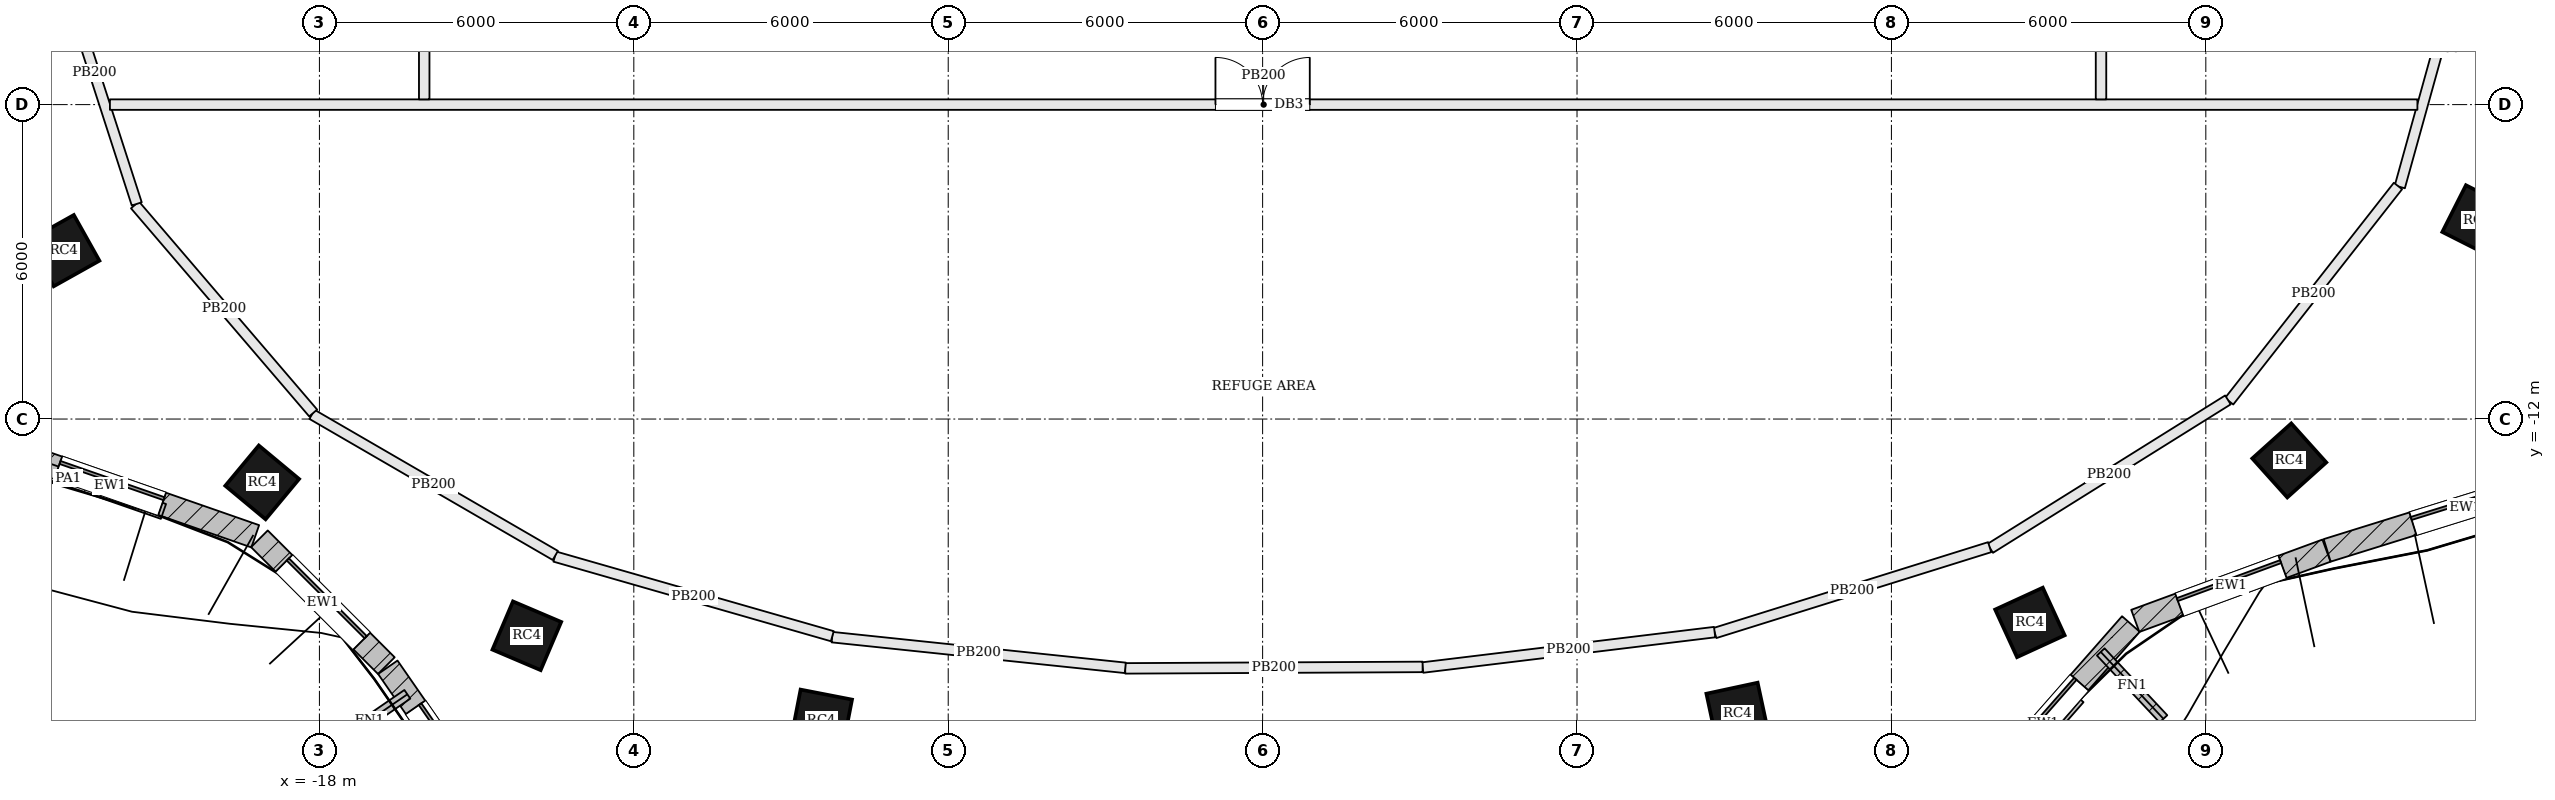
"""IFC4 building model, lengths in metres.
Left out: names, types, materials, properties, quantities, classifications, styles, units other than length and angle.
Written with IfcOpenShell. Run it as: python <this file> out.ifc"""

import sys

from ifc_helpers import new_model, si_unit, direction, frame, frame_2d, origin, origin_2d, place, context, subcontext, project, spatial, rectangle, extrude, element, fill, save


model = new_model("IFC4")
c1 = context("Model", 3, precision=1e-05, world=origin(), true_north=direction((0.0, 1.0)))
c2 = subcontext(c1, "Body", "Model", "MODEL_VIEW")
j1 = project(units=[si_unit("LENGTHUNIT", "METRE"), si_unit("PLANEANGLEUNIT", "RADIAN")], contexts=[c1])
p1 = place(None, origin())
s1 = spatial("IfcSite", under=j1, at=p1, CompositionType="ELEMENT")
p2 = place(p1, origin())
s2 = spatial("IfcBuilding", under=s1, at=p2, CompositionType="ELEMENT")
p3 = place(p2, frame((0.0, 0.0, 240.9)))
s3 = spatial("IfcBuildingStorey", under=s2, at=p3, CompositionType="ELEMENT", Elevation=240.9)
for number, where, z_axis, x_axis in (
    (1, (-22.879, -8.787, 0.0), (0.0, 0.0, 1.0), (0.489, -0.873, 0.0)),
    (2, (-19.092, -13.209, 0.0), (0.0, 0.0, 1.0), (0.769, -0.639, 0.0)),
    (3, (-14.042, -16.136, 0.0), (0.0, 0.0, 1.0), (0.92, -0.392, 0.0)),
    (4, (-8.422, -17.749, 0.0), (0.0, 0.0, 1.0), (0.982, -0.191, 0.0)),
    (5, (9.063, -17.625, 0.0), (0.0, 0.0, 1.0), (0.978, 0.21, 0.0)),
    (6, (14.643, -15.881, 0.0), (0.0, 0.0, 1.0), (0.909, 0.417, 0.0)),
    (7, (19.593, -12.79, 0.0), (0.0, 0.0, 1.0), (0.744, 0.668, 0.0)),
    (8, (23.185, -8.21, 0.0), (0.0, 0.0, 1.0), (0.451, 0.893, 0.0)),
):
    element("IfcColumn", number, at=place(p3, frame(where, z_axis=z_axis, x_axis=x_axis)), inside=s3, PredefinedType="COLUMN", context=c2, shape_type="SweptSolid", body=[
        extrude(rectangle(XDim=1.0, YDim=1.0, at=origin_2d()), origin(), (0.0, 0.0, 1.0), 3.9),
    ])
p4 = place(p3, frame((-24.761, -12.31, 0.0), z_axis=(0.0, 0.0, 1.0), x_axis=(0.944397305248, -0.328806523414, 0.0)))
e9 = element("IfcWall", 9, at=p4, inside=s3, PredefinedType="SOLIDWALL", context=c2, shape_type="SweptSolid", body=[
    extrude(rectangle(XDim=5.862, YDim=0.45, at=frame_2d((2.931, 0.0))), origin(), (0.0, 0.0, 1.0), 3.7),
])
p5 = place(p4, frame((1.881, 0.0, 0.9)))
e10 = element("IfcOpeningElement", 10, at=p5, cuts=e9, PredefinedType="OPENING", context=c2, shape_type="SweptSolid", body=[
    extrude(rectangle(XDim=2.1, YDim=2.3, at=frame_2d((1.05, 1.15))), frame((0.0, 0.235, 0.0), z_axis=(0.0, -1.0, 0.0), x_axis=(1.0, 0.0, 0.0)), (0.0, 0.0, 1.0), 0.47),
])
p6 = place(p3, frame((-19.145, -14.285, 0.0), z_axis=(0.0, 0.0, 1.0), x_axis=(0.707427521052, -0.706785895769, 0.0)))
e11 = element("IfcWall", 11, at=p6, inside=s3, PredefinedType="SOLIDWALL", context=c2, shape_type="SweptSolid", body=[
    extrude(rectangle(XDim=3.425, YDim=0.45, at=frame_2d((1.712, 0.0))), origin(), (0.0, 0.0, 1.0), 3.7),
])
p7 = place(p6, frame((0.662, 0.0, 0.9)))
e12 = element("IfcOpeningElement", 12, at=p7, cuts=e11, PredefinedType="OPENING", context=c2, shape_type="SweptSolid", body=[
    extrude(rectangle(XDim=2.1, YDim=2.3, at=frame_2d((1.05, 1.15))), frame((0.0, 0.235, 0.0), z_axis=(0.0, -1.0, 0.0), x_axis=(1.0, 0.0, 0.0)), (0.0, 0.0, 1.0), 0.47),
])
p8 = place(p3, frame((-16.695, -16.737, 0.0), z_axis=(0.0, 0.0, 1.0), x_axis=(0.569652445465, -0.821885692402, 0.0)))
e13 = element("IfcWall", 13, at=p8, inside=s3, PredefinedType="SOLIDWALL", context=c2, shape_type="SweptSolid", body=[
    extrude(rectangle(XDim=3.959, YDim=0.45, at=frame_2d((1.979, 0.0))), origin(), (0.0, 0.0, 1.0), 3.7),
])
p9 = place(p8, frame((0.929, 0.0, 0.9)))
e14 = element("IfcOpeningElement", 14, at=p9, cuts=e13, PredefinedType="OPENING", context=c2, shape_type="SweptSolid", body=[
    extrude(rectangle(XDim=2.1, YDim=2.3, at=frame_2d((1.05, 1.15))), frame((0.0, 0.235, 0.0), z_axis=(0.0, -1.0, 0.0), x_axis=(1.0, 0.0, 0.0)), (0.0, 0.0, 1.0), 0.47),
])
p10 = place(p3, frame((13.221, -19.719, 0.0), z_axis=(0.0, 0.0, 1.0), x_axis=(0.660424908916, 0.750892095899, 0.0)))
e15 = element("IfcWall", 15, at=p10, inside=s3, PredefinedType="SOLIDWALL", context=c2, shape_type="SweptSolid", body=[
    extrude(rectangle(XDim=5.071, YDim=0.45, at=frame_2d((2.535, 0.0))), origin(), (0.0, 0.0, 1.0), 3.7),
])
p11 = place(p10, frame((1.485, 0.0, 0.9)))
e16 = element("IfcOpeningElement", 16, at=p11, cuts=e15, PredefinedType="OPENING", context=c2, shape_type="SweptSolid", body=[
    extrude(rectangle(XDim=2.1, YDim=2.3, at=frame_2d((1.05, 1.15))), frame((0.0, 0.235, 0.0), z_axis=(0.0, -1.0, 0.0), x_axis=(1.0, 0.0, 0.0)), (0.0, 0.0, 1.0), 0.47),
])
p12 = place(p3, frame((16.654, -15.852, 0.0), z_axis=(0.0, 0.0, 1.0), x_axis=(0.938636568132, 0.344907803572, 0.0)))
e17 = element("IfcWall", 17, at=p12, inside=s3, PredefinedType="SOLIDWALL", context=c2, shape_type="SweptSolid", body=[
    extrude(rectangle(XDim=3.887, YDim=0.45, at=frame_2d((1.944, 0.0))), origin(), (0.0, 0.0, 1.0), 3.7),
])
p13 = place(p12, frame((0.894, 0.0, 0.9)))
e18 = element("IfcOpeningElement", 18, at=p13, cuts=e17, PredefinedType="OPENING", context=c2, shape_type="SweptSolid", body=[
    extrude(rectangle(XDim=2.1, YDim=2.3, at=frame_2d((1.05, 1.15))), frame((0.0, 0.235, 0.0), z_axis=(0.0, -1.0, 0.0), x_axis=(1.0, 0.0, 0.0)), (0.0, 0.0, 1.0), 0.47),
])
p14 = place(p3, frame((20.316, -14.507, 0.0), z_axis=(0.0, 0.0, 1.0), x_axis=(0.954807195185, 0.297225873743, 0.0)))
e19 = element("IfcWall", 19, at=p14, inside=s3, PredefinedType="SOLIDWALL", context=c2, shape_type="SweptSolid", body=[
    extrude(rectangle(XDim=5.526, YDim=0.45, at=frame_2d((2.763, 0.0))), origin(), (0.0, 0.0, 1.0), 3.7),
])
p15 = place(p14, frame((1.713, 0.0, 0.9)))
e20 = element("IfcOpeningElement", 20, at=p15, cuts=e19, PredefinedType="OPENING", context=c2, shape_type="SweptSolid", body=[
    extrude(rectangle(XDim=2.1, YDim=2.3, at=frame_2d((1.05, 1.15))), frame((0.0, 0.235, 0.0), z_axis=(0.0, -1.0, 0.0), x_axis=(1.0, 0.0, 0.0)), (0.0, 0.0, 1.0), 0.47),
])
p16 = place(p3, frame((-16.322, -17.253, 0.0), z_axis=(0.0, 0.0, 1.0), x_axis=(-0.824440606412, -0.565948483962, 0.0)))
e21 = element("IfcWall", 21, at=p16, inside=s3, PredefinedType="SOLIDWALL", context=c2, shape_type="SweptSolid", body=[
    extrude(rectangle(XDim=1.75, YDim=0.2, at=frame_2d((0.875, 0.0))), origin(), (0.0, 0.0, 1.0), 3.7),
])
p17 = place(p3, frame((15.995, -16.444, 0.0), z_axis=(0.0, 0.0, 1.0), x_axis=(0.683852936488, -0.729619874494, 0.0)))
e22 = element("IfcWall", 22, at=p17, inside=s3, PredefinedType="SOLIDWALL", context=c2, shape_type="SweptSolid", body=[
    extrude(rectangle(XDim=1.75, YDim=0.2, at=frame_2d((0.875, 0.0))), origin(), (0.0, 0.0, 1.0), 3.7),
])
p18 = place(p3, frame((-24.605, -12.5, 3.9), z_axis=(0.0, 0.0, 1.0), x_axis=(0.944373295981, -0.328875474668, 0.0)))
e23 = element("IfcWall", 23, at=p18, inside=s3, PredefinedType="PARAPET", context=c2, shape_type="SweptSolid", body=[
    extrude(rectangle(XDim=3.842, YDim=0.3, at=frame_2d((1.921, 0.0))), origin(), (0.0, 0.0, 1.0), 1.1),
])
p19 = place(p3, frame((13.339, -19.822, 3.9), z_axis=(0.0, 0.0, 1.0), x_axis=(0.660445690116, 0.7508738179, 0.0)))
e24 = element("IfcWall", 24, at=p19, inside=s3, PredefinedType="PARAPET", context=c2, shape_type="SweptSolid", body=[
    extrude(rectangle(XDim=3.353, YDim=0.3, at=frame_2d((1.677, 0.0))), origin(), (0.0, 0.0, 1.0), 1.1),
])
p20 = place(p3, frame((23.167, -2.295, 0.0), z_axis=(0.0, 0.0, 1.0), x_axis=(-0.267604764515, -0.963528769684, 0.0)))
e25 = element("IfcWall", 25, at=p20, inside=s3, PredefinedType="PARTITIONING", context=c2, shape_type="SweptSolid", body=[
    extrude(rectangle(XDim=5.475, YDim=0.2, at=frame_2d((2.737, 0.0))), origin(), (0.0, 0.0, 1.0), 3.7),
])
p21 = place(p3, frame((21.667, -7.553, 0.0), z_axis=(0.0, 0.0, 1.0), x_axis=(-0.617143909163, -0.786850300491, 0.0)))
e26 = element("IfcWall", 26, at=p21, inside=s3, PredefinedType="PARTITIONING", context=c2, shape_type="SweptSolid", body=[
    extrude(rectangle(XDim=5.221, YDim=0.2, at=frame_2d((2.61, 0.0))), origin(), (0.0, 0.0, 1.0), 3.7),
])
p22 = place(p3, frame((18.422, -11.635, 0.0), z_axis=(0.0, 0.0, 1.0), x_axis=(-0.848223876435, -0.529637853108, 0.0)))
e27 = element("IfcWall", 27, at=p22, inside=s3, PredefinedType="PARTITIONING", context=c2, shape_type="SweptSolid", body=[
    extrude(rectangle(XDim=5.349, YDim=0.2, at=frame_2d((2.674, 0.0))), origin(), (0.0, 0.0, 1.0), 3.7),
])
p23 = place(p3, frame((13.875, -14.445, 0.0), z_axis=(0.0, 0.0, 1.0), x_axis=(-0.954489463941, -0.298244636541, 0.0)))
e28 = element("IfcWall", 28, at=p23, inside=s3, PredefinedType="PARTITIONING", context=c2, shape_type="SweptSolid", body=[
    extrude(rectangle(XDim=5.495, YDim=0.2, at=frame_2d((2.748, 0.0))), origin(), (0.0, 0.0, 1.0), 3.7),
])
p24 = place(p3, frame((8.626, -16.066, 0.0), z_axis=(0.0, 0.0, 1.0), x_axis=(-0.992720392358, -0.120441780942, 0.0)))
e29 = element("IfcWall", 29, at=p24, inside=s3, PredefinedType="PARTITIONING", context=c2, shape_type="SweptSolid", body=[
    extrude(rectangle(XDim=5.613, YDim=0.2, at=frame_2d((2.806, 0.0))), origin(), (0.0, 0.0, 1.0), 3.7),
])
p25 = place(p3, frame((3.053, -16.73, 0.0), z_axis=(0.0, 0.0, 1.0), x_axis=(-0.999987762334, -0.004947239951, 0.0)))
e30 = element("IfcWall", 30, at=p25, inside=s3, PredefinedType="PARTITIONING", context=c2, shape_type="SweptSolid", body=[
    extrude(rectangle(XDim=5.675, YDim=0.2, at=frame_2d((2.837, 0.0))), origin(), (0.0, 0.0, 1.0), 3.7),
])
p26 = place(p3, frame((-2.621, -16.748, 0.0), z_axis=(0.0, 0.0, 1.0), x_axis=(-0.99455907377, 0.104174127222, 0.0)))
e31 = element("IfcWall", 31, at=p26, inside=s3, PredefinedType="PARTITIONING", context=c2, shape_type="SweptSolid", body=[
    extrude(rectangle(XDim=5.625, YDim=0.2, at=frame_2d((2.812, 0.0))), origin(), (0.0, 0.0, 1.0), 3.7),
])
p27 = place(p3, frame((-8.212, -16.144, 0.0), z_axis=(0.0, 0.0, 1.0), x_axis=(-0.961229052449, 0.275751171762, 0.0)))
e32 = element("IfcWall", 32, at=p27, inside=s3, PredefinedType="PARTITIONING", context=c2, shape_type="SweptSolid", body=[
    extrude(rectangle(XDim=5.509, YDim=0.2, at=frame_2d((2.754, 0.0))), origin(), (0.0, 0.0, 1.0), 3.7),
])
p28 = place(p3, frame((-13.498, -14.603, 0.0), z_axis=(0.0, 0.0, 1.0), x_axis=(-0.865099094035, 0.501600994317, 0.0)))
e33 = element("IfcWall", 33, at=p28, inside=s3, PredefinedType="PARTITIONING", context=c2, shape_type="SweptSolid", body=[
    extrude(rectangle(XDim=5.367, YDim=0.2, at=frame_2d((2.684, 0.0))), origin(), (0.0, 0.0, 1.0), 3.7),
])
p29 = place(p3, frame((-18.119, -11.885, 0.0), z_axis=(0.0, 0.0, 1.0), x_axis=(-0.650510608515, 0.759497168006, 0.0)))
e34 = element("IfcWall", 34, at=p29, inside=s3, PredefinedType="PARTITIONING", context=c2, shape_type="SweptSolid", body=[
    extrude(rectangle(XDim=5.228, YDim=0.2, at=frame_2d((2.614, 0.0))), origin(), (0.0, 0.0, 1.0), 3.7),
])
p30 = place(p3, frame((-21.486, -7.895, 0.0), z_axis=(0.0, 0.0, 1.0), x_axis=(-0.307481575482, 0.951554034587, 0.0)))
e35 = element("IfcWall", 35, at=p30, inside=s3, PredefinedType="PARTITIONING", context=c2, shape_type="SweptSolid", body=[
    extrude(rectangle(XDim=5.259, YDim=0.2, at=frame_2d((2.629, 0.0))), origin(), (0.0, 0.0, 1.0), 3.7),
])
p31 = place(p3, frame((-21.998, -6.0, 0.0), z_axis=(0.0, 0.0, 1.0), x_axis=(1.0, 0.0, 0.0)))
e36 = element("IfcWall", 36, at=p31, inside=s3, PredefinedType="PARTITIONING", context=c2, shape_type="SweptSolid", body=[
    extrude(rectangle(XDim=44.036, YDim=0.2, at=frame_2d((22.018, 0.0))), origin(), (0.0, 0.0, 1.0), 3.7),
])
p32 = place(p31, frame((21.098, 0.0, 0.0)))
e37 = element("IfcOpeningElement", 37, at=p32, cuts=e36, PredefinedType="OPENING", context=c2, shape_type="SweptSolid", body=[
    extrude(rectangle(XDim=1.8, YDim=2.1, at=frame_2d((0.9, 1.05))), frame((0.0, 0.11, 0.0), z_axis=(0.0, -1.0, 0.0), x_axis=(1.0, 0.0, 0.0)), (0.0, 0.0, 1.0), 0.22),
])
p33 = place(p3, frame((-16.0, 13.047, 0.0), z_axis=(0.0, 0.0, 1.0), x_axis=(0.0, -1.0, 0.0)))
e38 = element("IfcWall", 38, at=p33, inside=s3, PredefinedType="PARTITIONING", context=c2, shape_type="SweptSolid", body=[
    extrude(rectangle(XDim=18.947, YDim=0.2, at=frame_2d((9.474, 0.0))), origin(), (0.0, 0.0, 1.0), 3.7),
])
p34 = place(p33, frame((7.647, 0.0, 0.0)))
e39 = element("IfcOpeningElement", 39, at=p34, cuts=e38, PredefinedType="OPENING", context=c2, shape_type="SweptSolid", body=[
    extrude(rectangle(XDim=1.8, YDim=2.1, at=frame_2d((0.9, 1.05))), frame((0.0, 0.11, 0.0), z_axis=(0.0, -1.0, 0.0), x_axis=(1.0, 0.0, 0.0)), (0.0, 0.0, 1.0), 0.22),
])
p35 = place(p3, frame((16.0, -5.9, 0.0), z_axis=(0.0, 0.0, 1.0), x_axis=(0.0, 1.0, 0.0)))
e40 = element("IfcWall", 40, at=p35, inside=s3, PredefinedType="PARTITIONING", context=c2, shape_type="SweptSolid", body=[
    extrude(rectangle(XDim=18.952, YDim=0.2, at=frame_2d((9.476, 0.0))), origin(), (0.0, 0.0, 1.0), 3.7),
])
p36 = place(p35, frame((9.5, 0.0, 0.0)))
e41 = element("IfcOpeningElement", 41, at=p36, cuts=e40, PredefinedType="OPENING", context=c2, shape_type="SweptSolid", body=[
    extrude(rectangle(XDim=1.8, YDim=2.1, at=frame_2d((0.9, 1.05))), frame((0.0, 0.11, 0.0), z_axis=(0.0, -1.0, 0.0), x_axis=(1.0, 0.0, 0.0)), (0.0, 0.0, 1.0), 0.22),
])
p37 = place(p5, origin())
e42 = element("IfcWindow", 42, at=p37, inside=s3, PartitioningType="SINGLE_PANEL", PredefinedType="WINDOW", context=c2, shape_type="SweptSolid", body=[
    extrude(rectangle(XDim=2.1, YDim=2.3, at=frame_2d((1.05, 1.15))), frame((0.0, 0.135, 0.0), z_axis=(0.0, -1.0, 0.0), x_axis=(1.0, 0.0, 0.0)), (0.0, 0.0, 1.0), 0.06),
])
fill(e10, e42)
p38 = place(p7, origin())
e43 = element("IfcWindow", 43, at=p38, inside=s3, PartitioningType="SINGLE_PANEL", PredefinedType="WINDOW", context=c2, shape_type="SweptSolid", body=[
    extrude(rectangle(XDim=2.1, YDim=2.3, at=frame_2d((1.05, 1.15))), frame((0.0, 0.135, 0.0), z_axis=(0.0, -1.0, 0.0), x_axis=(1.0, 0.0, 0.0)), (0.0, 0.0, 1.0), 0.06),
])
fill(e12, e43)
p39 = place(p9, origin())
e44 = element("IfcWindow", 44, at=p39, inside=s3, PartitioningType="SINGLE_PANEL", PredefinedType="WINDOW", context=c2, shape_type="SweptSolid", body=[
    extrude(rectangle(XDim=2.1, YDim=2.3, at=frame_2d((1.05, 1.15))), frame((0.0, 0.135, 0.0), z_axis=(0.0, -1.0, 0.0), x_axis=(1.0, 0.0, 0.0)), (0.0, 0.0, 1.0), 0.06),
])
fill(e14, e44)
p40 = place(p11, origin())
e45 = element("IfcWindow", 45, at=p40, inside=s3, PartitioningType="SINGLE_PANEL", PredefinedType="WINDOW", context=c2, shape_type="SweptSolid", body=[
    extrude(rectangle(XDim=2.1, YDim=2.3, at=frame_2d((1.05, 1.15))), frame((0.0, 0.135, 0.0), z_axis=(0.0, -1.0, 0.0), x_axis=(1.0, 0.0, 0.0)), (0.0, 0.0, 1.0), 0.06),
])
fill(e16, e45)
p41 = place(p13, origin())
e46 = element("IfcWindow", 46, at=p41, inside=s3, PartitioningType="SINGLE_PANEL", PredefinedType="WINDOW", context=c2, shape_type="SweptSolid", body=[
    extrude(rectangle(XDim=2.1, YDim=2.3, at=frame_2d((1.05, 1.15))), frame((0.0, 0.135, 0.0), z_axis=(0.0, -1.0, 0.0), x_axis=(1.0, 0.0, 0.0)), (0.0, 0.0, 1.0), 0.06),
])
fill(e18, e46)
p42 = place(p15, origin())
e47 = element("IfcWindow", 47, at=p42, inside=s3, PartitioningType="SINGLE_PANEL", PredefinedType="WINDOW", context=c2, shape_type="SweptSolid", body=[
    extrude(rectangle(XDim=2.1, YDim=2.3, at=frame_2d((1.05, 1.15))), frame((0.0, 0.135, 0.0), z_axis=(0.0, -1.0, 0.0), x_axis=(1.0, 0.0, 0.0)), (0.0, 0.0, 1.0), 0.06),
])
fill(e20, e47)
p43 = place(p32, origin())
e48 = element("IfcDoor", 48, at=p43, inside=s3, OperationType="DOUBLE_DOOR_SINGLE_SWING", PredefinedType="DOOR", context=c2, shape_type="SweptSolid", body=[
    extrude(rectangle(XDim=1.8, YDim=2.1, at=frame_2d((0.9, 1.05))), frame((0.0, 0.025, 0.0), z_axis=(0.0, -1.0, 0.0), x_axis=(1.0, 0.0, 0.0)), (0.0, 0.0, 1.0), 0.05),
])
fill(e37, e48)
save(model, sys.argv[1])
